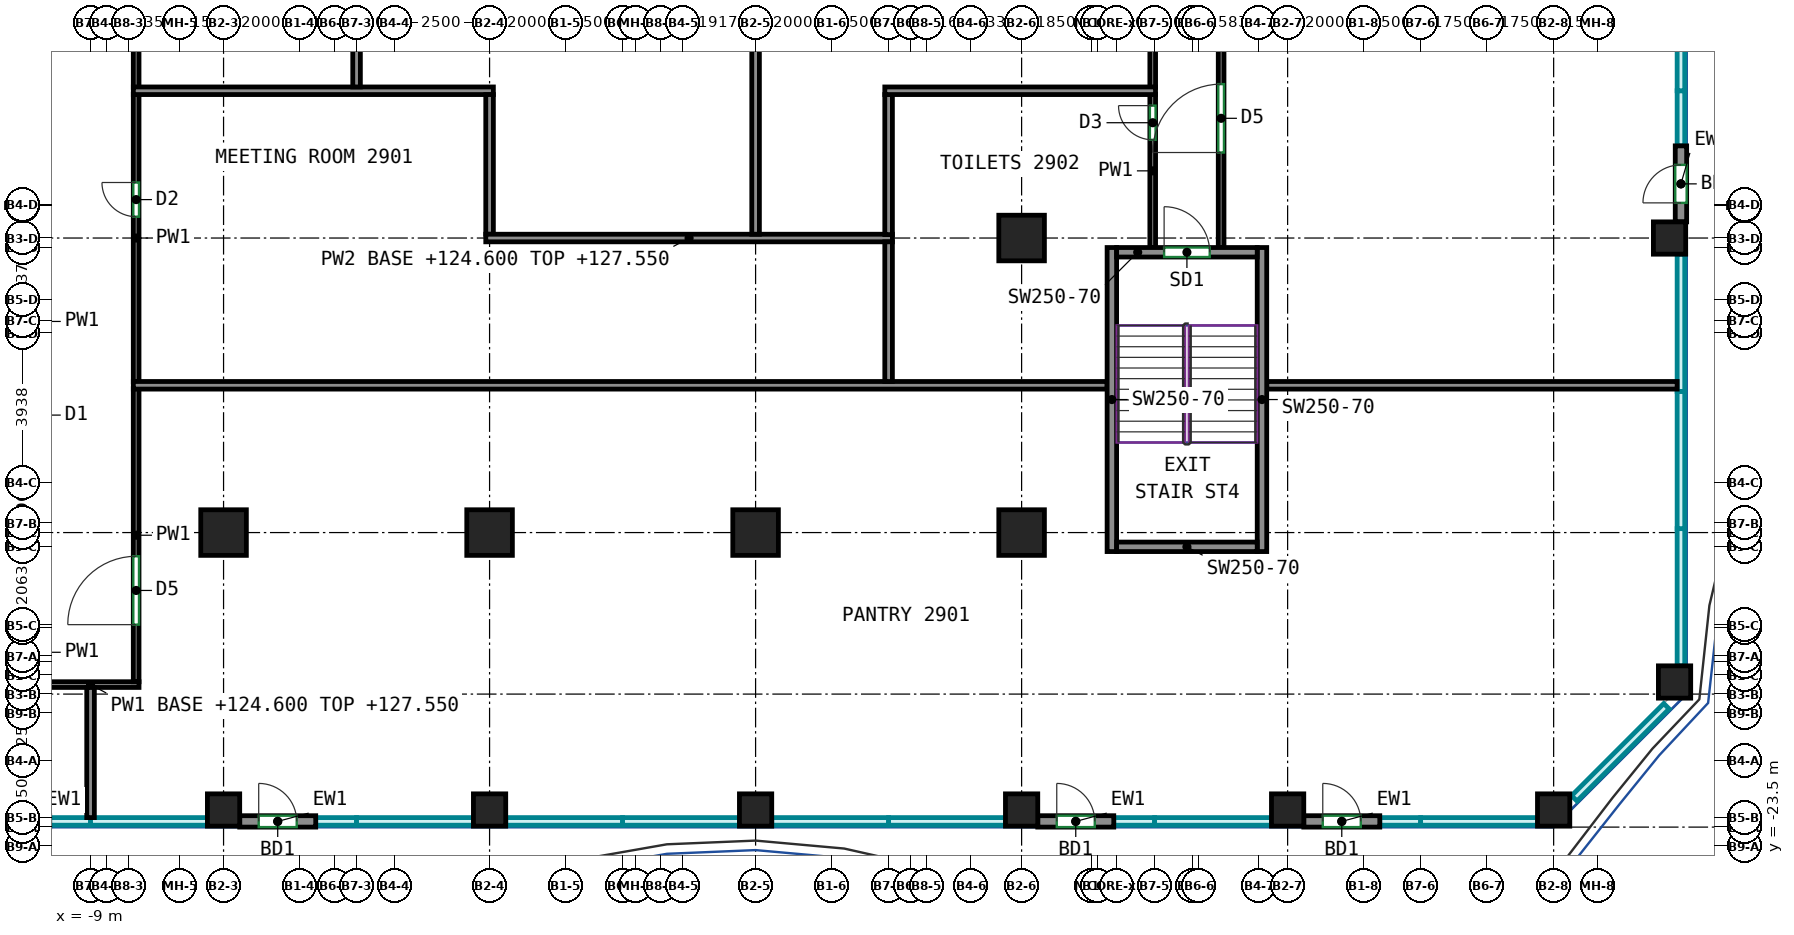
"""IFC4 building model, lengths in metres.
Left out: names, types, materials, properties, quantities, classifications, styles, units other than length and angle.
Written with IfcOpenShell. Run it as: python <this file> out.ifc"""

import sys

from ifc_helpers import new_model, si_unit, direction, frame, frame_2d, origin, origin_2d, place, context, subcontext, project, spatial, rectangle, extrude, source, transform, mapped, element, fill, save


model = new_model("IFC4")
c1 = context("Model", 3, precision=1e-05, world=origin(), true_north=direction((0.0, 1.0)))
c2 = subcontext(c1, "Body", "Model", "MODEL_VIEW")
j1 = project(units=[si_unit("LENGTHUNIT", "METRE"), si_unit("PLANEANGLEUNIT", "RADIAN")], contexts=[c1])
p1 = place(None, origin())
s1 = spatial("IfcSite", under=j1, at=p1, CompositionType="ELEMENT")
p2 = place(p1, origin())
s2 = spatial("IfcBuilding", under=s1, at=p2, CompositionType="ELEMENT")
p3 = place(p2, frame((0.0, 0.0, 124.6)))
s3 = spatial("IfcBuildingStorey", under=s2, at=p3, CompositionType="ELEMENT", Elevation=124.6)
m1 = source(origin(), c2, "Body", "SweptSolid", [
    extrude(rectangle(XDim=0.85, YDim=0.85, at=origin_2d()), origin(), (0.0, 0.0, 1.0), 3.6),
])
p4 = place(p3, frame((-5.5, -22.55, 0.0), z_axis=(0.0, 0.0, 1.0), x_axis=(1.0, 0.0, 0.0)))
e1 = element("IfcColumn", 1, at=p4, inside=s3, PredefinedType="COLUMN", context=c2, shape_type="MappedRepresentation", body=[
    mapped(m1, transform((0.0, 0.0, 0.0))),
])
m2 = source(origin(), c2, "Body", "SweptSolid", [
    extrude(rectangle(XDim=1.2, YDim=1.2, at=origin_2d()), origin(), (0.0, 0.0, 1.0), 3.6),
])
p5 = place(p3, frame((-5.5, -15.25, 0.0), z_axis=(0.0, 0.0, 1.0), x_axis=(1.0, 0.0, 0.0)))
e2 = element("IfcColumn", 2, at=p5, inside=s3, PredefinedType="COLUMN", context=c2, shape_type="MappedRepresentation", body=[
    mapped(m2, transform((0.0, 0.0, 0.0))),
])
p6 = place(p3, frame((1.5, -22.55, 0.0), z_axis=(0.0, 0.0, 1.0), x_axis=(1.0, 0.0, 0.0)))
e3 = element("IfcColumn", 3, at=p6, inside=s3, PredefinedType="COLUMN", context=c2, shape_type="MappedRepresentation", body=[
    mapped(m1, transform((0.0, 0.0, 0.0))),
])
p7 = place(p3, frame((1.5, -15.25, 0.0), z_axis=(0.0, 0.0, 1.0), x_axis=(1.0, 0.0, 0.0)))
e4 = element("IfcColumn", 4, at=p7, inside=s3, PredefinedType="COLUMN", context=c2, shape_type="MappedRepresentation", body=[
    mapped(m2, transform((0.0, 0.0, 0.0))),
])
p8 = place(p3, frame((8.5, -22.55, 0.0), z_axis=(0.0, 0.0, 1.0), x_axis=(1.0, 0.0, 0.0)))
e5 = element("IfcColumn", 5, at=p8, inside=s3, PredefinedType="COLUMN", context=c2, shape_type="MappedRepresentation", body=[
    mapped(m1, transform((0.0, 0.0, 0.0))),
])
p9 = place(p3, frame((8.5, -15.25, 0.0), z_axis=(0.0, 0.0, 1.0), x_axis=(1.0, 0.0, 0.0)))
e6 = element("IfcColumn", 6, at=p9, inside=s3, PredefinedType="COLUMN", context=c2, shape_type="MappedRepresentation", body=[
    mapped(m2, transform((0.0, 0.0, 0.0))),
])
p10 = place(p3, frame((15.5, -22.55, 0.0), z_axis=(0.0, 0.0, 1.0), x_axis=(1.0, 0.0, 0.0)))
e7 = element("IfcColumn", 7, at=p10, inside=s3, PredefinedType="COLUMN", context=c2, shape_type="MappedRepresentation", body=[
    mapped(m1, transform((0.0, 0.0, 0.0))),
])
for number, where, z_axis, x_axis in (
    (8, (15.5, -15.25, 0.0), (0.0, 0.0, 1.0), (1.0, 0.0, 0.0)),
    (9, (15.5, -7.5, 0.0), (0.0, 0.0, 1.0), (1.0, 0.0, 0.0)),
):
    element("IfcColumn", number, at=place(p3, frame(where, z_axis=z_axis, x_axis=x_axis)), inside=s3, PredefinedType="COLUMN", context=c2, shape_type="MappedRepresentation", body=[
        mapped(m2, transform((0.0, 0.0, 0.0))),
    ])
for number, where, z_axis, x_axis in (
    (10, (22.5, -22.55, 0.0), (0.0, 0.0, 1.0), (1.0, 0.0, 0.0)),
    (11, (29.5, -22.55, 0.0), (0.0, 0.0, 1.0), (1.0, 0.0, 0.0)),
    (12, (32.55, -7.5, 0.0), (0.0, 0.0, 1.0), (1.0, 0.0, 0.0)),
    (13, (32.682, -19.182, 0.0), (0.0, 0.0, 1.0), (1.0, 0.0, 0.0)),
):
    element("IfcColumn", number, at=place(p3, frame(where, z_axis=z_axis, x_axis=x_axis)), inside=s3, PredefinedType="COLUMN", context=c2, shape_type="MappedRepresentation", body=[
        mapped(m1, transform((0.0, 0.0, 0.0))),
    ])
m3 = source(origin(), c2, "Body", "SweptSolid", [
    extrude(rectangle(XDim=8.0, YDim=0.25, at=frame_2d((4.0, 0.0))), origin(), (0.0, 0.0, 1.0), 3.6),
])
for number, where, z_axis, x_axis in (
    (14, (17.875, -15.75, 0.0), (0.0, 0.0, 1.0), (0.0, 1.0, 0.0)),
    (15, (21.825, -15.75, 0.0), (0.0, 0.0, 1.0), (0.0, 1.0, 0.0)),
):
    element("IfcWall", number, at=place(p3, frame(where, z_axis=z_axis, x_axis=x_axis)), inside=s3, PredefinedType="SHEAR", context=c2, shape_type="MappedRepresentation", body=[
        mapped(m3, transform((0.0, 0.0, 0.0))),
    ])
m4 = source(origin(), c2, "Body", "SweptSolid", [
    extrude(rectangle(XDim=3.7, YDim=0.25, at=frame_2d((1.85, 0.0))), origin(), (0.0, 0.0, 1.0), 3.6),
])
p11 = place(p3, frame((18.0, -15.625, 0.0), z_axis=(0.0, 0.0, 1.0), x_axis=(1.0, 0.0, 0.0)))
e16 = element("IfcWall", 16, at=p11, inside=s3, PredefinedType="SHEAR", context=c2, shape_type="MappedRepresentation", body=[
    mapped(m4, transform((0.0, 0.0, 0.0))),
])
p12 = place(p3, frame((18.0, -7.875, 0.0), z_axis=(0.0, 0.0, 1.0), x_axis=(1.0, 0.0, 0.0)))
e17 = element("IfcWall", 17, at=p12, inside=s3, PredefinedType="SHEAR", context=c2, shape_type="MappedRepresentation", body=[
    mapped(m4, transform((0.0, 0.0, 0.0))),
])
p13 = place(p12, frame((1.25, 0.0, 0.0)))
e18 = element("IfcOpeningElement", 18, at=p13, cuts=e17, PredefinedType="OPENING", context=c2, shape_type="SweptSolid", body=[
    extrude(rectangle(XDim=1.2, YDim=2.1, at=frame_2d((0.6, 1.05))), frame((0.0, 0.135, 0.0), z_axis=(0.0, -1.0, 0.0), x_axis=(1.0, 0.0, 0.0)), (0.0, 0.0, 1.0), 0.27),
])
m5 = source(origin(), c2, "Body", "SweptSolid", [
    extrude(rectangle(XDim=2.0, YDim=0.3, at=frame_2d((1.0, 0.0))), origin(), (0.0, 0.0, 1.0), 3.6),
])
p14 = place(p3, frame((-5.075, -22.85, 0.0), z_axis=(0.0, 0.0, 1.0), x_axis=(1.0, 0.0, 0.0)))
e19 = element("IfcWall", 19, at=p14, inside=s3, PredefinedType="SOLIDWALL", context=c2, shape_type="MappedRepresentation", body=[
    mapped(m5, transform((0.0, 0.0, 0.0))),
])
p15 = place(p14, frame((0.5, 0.0, 0.0)))
e20 = element("IfcOpeningElement", 20, at=p15, cuts=e19, PredefinedType="OPENING", context=c2, shape_type="SweptSolid", body=[
    extrude(rectangle(XDim=1.0, YDim=2.1, at=frame_2d((0.5, 1.05))), frame((0.0, 0.16, 0.0), z_axis=(0.0, -1.0, 0.0), x_axis=(1.0, 0.0, 0.0)), (0.0, 0.0, 1.0), 0.32),
])
p16 = place(p3, frame((15.925, -22.85, 0.0), z_axis=(0.0, 0.0, 1.0), x_axis=(1.0, 0.0, 0.0)))
e21 = element("IfcWall", 21, at=p16, inside=s3, PredefinedType="SOLIDWALL", context=c2, shape_type="MappedRepresentation", body=[
    mapped(m5, transform((0.0, 0.0, 0.0))),
])
p17 = place(p16, frame((0.5, 0.0, 0.0)))
e22 = element("IfcOpeningElement", 22, at=p17, cuts=e21, PredefinedType="OPENING", context=c2, shape_type="SweptSolid", body=[
    extrude(rectangle(XDim=1.0, YDim=2.1, at=frame_2d((0.5, 1.05))), frame((0.0, 0.16, 0.0), z_axis=(0.0, -1.0, 0.0), x_axis=(1.0, 0.0, 0.0)), (0.0, 0.0, 1.0), 0.32),
])
p18 = place(p3, frame((22.925, -22.85, 0.0), z_axis=(0.0, 0.0, 1.0), x_axis=(1.0, 0.0, 0.0)))
e23 = element("IfcWall", 23, at=p18, inside=s3, PredefinedType="SOLIDWALL", context=c2, shape_type="MappedRepresentation", body=[
    mapped(m5, transform((0.0, 0.0, 0.0))),
])
p19 = place(p18, frame((0.5, 0.0, 0.0)))
e24 = element("IfcOpeningElement", 24, at=p19, cuts=e23, PredefinedType="OPENING", context=c2, shape_type="SweptSolid", body=[
    extrude(rectangle(XDim=1.0, YDim=2.1, at=frame_2d((0.5, 1.05))), frame((0.0, 0.16, 0.0), z_axis=(0.0, -1.0, 0.0), x_axis=(1.0, 0.0, 0.0)), (0.0, 0.0, 1.0), 0.32),
])
p20 = place(p3, frame((32.85, -7.075, 0.0), z_axis=(0.0, 0.0, 1.0), x_axis=(0.0, 1.0, 0.0)))
e25 = element("IfcWall", 25, at=p20, inside=s3, PredefinedType="SOLIDWALL", context=c2, shape_type="MappedRepresentation", body=[
    mapped(m5, transform((0.0, 0.0, 0.0))),
])
p21 = place(p20, frame((0.5, 0.0, 0.0)))
e26 = element("IfcOpeningElement", 26, at=p21, cuts=e25, PredefinedType="OPENING", context=c2, shape_type="SweptSolid", body=[
    extrude(rectangle(XDim=1.0, YDim=2.1, at=frame_2d((0.5, 1.05))), frame((0.0, 0.16, 0.0), z_axis=(0.0, -1.0, 0.0), x_axis=(1.0, 0.0, 0.0)), (0.0, 0.0, 1.0), 0.32),
])
p22 = place(p3, frame((-10.275, -19.25, 0.0), z_axis=(0.0, 0.0, 1.0), x_axis=(1.0, 0.0, 0.0)))
e27 = element("IfcWall", 27, at=p22, inside=s3, PredefinedType="PARTITIONING", context=c2, shape_type="SweptSolid", body=[
    extrude(rectangle(XDim=2.55, YDim=0.15, at=frame_2d((1.275, 0.0))), origin(), (0.0, 0.0, 1.0), 2.95),
])
p23 = place(p3, frame((-7.8, -3.535, 0.0), z_axis=(0.0, 0.0, 1.0), x_axis=(0.0, 1.0, 0.0)))
e28 = element("IfcWall", 28, at=p23, inside=s3, PredefinedType="PARTITIONING", context=c2, shape_type="SweptSolid", body=[
    extrude(rectangle(XDim=6.41, YDim=0.15, at=frame_2d((3.205, 0.0))), origin(), (0.0, 0.0, 1.0), 3.6),
])
p24 = place(p23, frame((2.304, 0.0, 0.0)))
e29 = element("IfcOpeningElement", 29, at=p24, cuts=e28, PredefinedType="OPENING", context=c2, shape_type="SweptSolid", body=[
    extrude(rectangle(XDim=0.9, YDim=2.1, at=frame_2d((0.45, 1.05))), frame((0.0, 0.085, 0.0), z_axis=(0.0, -1.0, 0.0), x_axis=(1.0, 0.0, 0.0)), (0.0, 0.0, 1.0), 0.17),
])
p25 = place(p3, frame((-7.8, -11.285, 0.0), z_axis=(0.0, 0.0, 1.0), x_axis=(0.0, 1.0, 0.0)))
e30 = element("IfcWall", 30, at=p25, inside=s3, PredefinedType="PARTITIONING", context=c2, shape_type="SweptSolid", body=[
    extrude(rectangle(XDim=7.57, YDim=0.15, at=frame_2d((3.785, 0.0))), origin(), (0.0, 0.0, 1.0), 3.6),
])
p26 = place(p25, frame((4.346, 0.0, 0.0)))
e31 = element("IfcOpeningElement", 31, at=p26, cuts=e30, PredefinedType="OPENING", context=c2, shape_type="SweptSolid", body=[
    extrude(rectangle(XDim=0.9, YDim=2.1, at=frame_2d((0.45, 1.05))), frame((0.0, 0.085, 0.0), z_axis=(0.0, -1.0, 0.0), x_axis=(1.0, 0.0, 0.0)), (0.0, 0.0, 1.0), 0.17),
])
p27 = place(p3, frame((-7.8, -19.175, 0.0), z_axis=(0.0, 0.0, 1.0), x_axis=(0.0, 1.0, 0.0)))
e32 = element("IfcWall", 32, at=p27, inside=s3, PredefinedType="PARTITIONING", context=c2, shape_type="SweptSolid", body=[
    extrude(rectangle(XDim=7.71, YDim=0.15, at=frame_2d((3.855, 0.0))), origin(), (0.0, 0.0, 1.0), 3.6),
])
p28 = place(p27, frame((1.502, 0.0, 0.0)))
e33 = element("IfcOpeningElement", 33, at=p28, cuts=e32, PredefinedType="OPENING", context=c2, shape_type="SweptSolid", body=[
    extrude(rectangle(XDim=1.8, YDim=2.1, at=frame_2d((0.9, 1.05))), frame((0.0, 0.085, 0.0), z_axis=(0.0, -1.0, 0.0), x_axis=(1.0, 0.0, 0.0)), (0.0, 0.0, 1.0), 0.17),
])
p29 = place(p3, frame((18.95, -7.75, 0.0), z_axis=(0.0, 0.0, 1.0), x_axis=(0.0, 1.0, 0.0)))
e34 = element("IfcWall", 34, at=p29, inside=s3, PredefinedType="PARTITIONING", context=c2, shape_type="SweptSolid", body=[
    extrude(rectangle(XDim=4.035, YDim=0.15, at=frame_2d((2.018, 0.0))), origin(), (0.0, 0.0, 1.0), 3.6),
])
p30 = place(p29, frame((2.834, 0.0, 0.0)))
e35 = element("IfcOpeningElement", 35, at=p30, cuts=e34, PredefinedType="OPENING", context=c2, shape_type="SweptSolid", body=[
    extrude(rectangle(XDim=0.9, YDim=2.1, at=frame_2d((0.45, 1.05))), frame((0.0, 0.085, 0.0), z_axis=(0.0, -1.0, 0.0), x_axis=(1.0, 0.0, 0.0)), (0.0, 0.0, 1.0), 0.17),
])
p31 = place(p3, frame((20.75, -7.75, 0.0), z_axis=(0.0, 0.0, 1.0), x_axis=(0.0, 1.0, 0.0)))
e36 = element("IfcWall", 36, at=p31, inside=s3, PredefinedType="PARTITIONING", context=c2, shape_type="SweptSolid", body=[
    extrude(rectangle(XDim=11.8, YDim=0.15, at=frame_2d((5.9, 0.0))), origin(), (0.0, 0.0, 1.0), 3.6),
])
p32 = place(p31, frame((2.5, 0.0, 0.0)))
e37 = element("IfcOpeningElement", 37, at=p32, cuts=e36, PredefinedType="OPENING", context=c2, shape_type="SweptSolid", body=[
    extrude(rectangle(XDim=1.8, YDim=2.1, at=frame_2d((0.9, 1.05))), frame((0.0, 0.085, 0.0), z_axis=(0.0, -1.0, 0.0), x_axis=(1.0, 0.0, 0.0)), (0.0, 0.0, 1.0), 0.17),
])
p33 = place(p3, frame((18.95, -3.535, 0.0), z_axis=(0.0, 0.0, 1.0), x_axis=(0.0, 1.0, 0.0)))
e38 = element("IfcWall", 38, at=p33, inside=s3, PredefinedType="PARTITIONING", context=c2, shape_type="SweptSolid", body=[
    extrude(rectangle(XDim=7.585, YDim=0.15, at=frame_2d((3.792, 0.0))), origin(), (0.0, 0.0, 1.0), 3.6),
])
p34 = place(p33, frame((2.734, 0.0, 0.0)))
e39 = element("IfcOpeningElement", 39, at=p34, cuts=e38, PredefinedType="OPENING", context=c2, shape_type="SweptSolid", body=[
    extrude(rectangle(XDim=0.9, YDim=2.1, at=frame_2d((0.45, 1.05))), frame((0.0, 0.085, 0.0), z_axis=(0.0, -1.0, 0.0), x_axis=(1.0, 0.0, 0.0)), (0.0, 0.0, 1.0), 0.17),
])
p35 = place(p3, frame((-9.0, -22.75, 0.0), z_axis=(0.0, 0.0, 1.0), x_axis=(0.0, 1.0, 0.0)))
e40 = element("IfcWall", 40, at=p35, inside=s3, PredefinedType="PARTITIONING", context=c2, shape_type="SweptSolid", body=[
    extrude(rectangle(XDim=3.424, YDim=0.2, at=frame_2d((1.712, 0.0))), origin(), (0.0, 0.0, 1.0), 3.6),
])
p36 = place(p3, frame((-7.874, -3.625, 0.0), z_axis=(0.0, 0.0, 1.0), x_axis=(1.0, 0.0, 0.0)))
e41 = element("IfcWall", 41, at=p36, inside=s3, PredefinedType="PARTITIONING", context=c2, shape_type="SweptSolid", body=[
    extrude(rectangle(XDim=9.474, YDim=0.2, at=frame_2d((4.737, 0.0))), origin(), (0.0, 0.0, 1.0), 3.6),
])
p37 = place(p3, frame((-2.0, -3.525, 0.0), z_axis=(0.0, 0.0, 1.0), x_axis=(0.0, 1.0, 0.0)))
e42 = element("IfcWall", 42, at=p37, inside=s3, PredefinedType="PARTITIONING", context=c2, shape_type="SweptSolid", body=[
    extrude(rectangle(XDim=6.399, YDim=0.2, at=frame_2d((3.199, 0.0))), origin(), (0.0, 0.0, 1.0), 3.6),
])
p38 = place(p3, frame((-7.874, -11.375, 0.0), z_axis=(0.0, 0.0, 1.0), x_axis=(1.0, 0.0, 0.0)))
e43 = element("IfcWall", 43, at=p38, inside=s3, PredefinedType="PARTITIONING", context=c2, shape_type="SweptSolid", body=[
    extrude(rectangle(XDim=25.624, YDim=0.2, at=frame_2d((12.812, 0.0))), origin(), (0.0, 0.0, 1.0), 3.6),
])
p39 = place(p3, frame((1.5, -7.4, 0.0), z_axis=(0.0, 0.0, 1.0), x_axis=(0.0, 1.0, 0.0)))
e44 = element("IfcWall", 44, at=p39, inside=s3, PredefinedType="PARTITIONING", context=c2, shape_type="SweptSolid", body=[
    extrude(rectangle(XDim=3.675, YDim=0.2, at=frame_2d((1.837, 0.0))), origin(), (0.0, 0.0, 1.0), 3.6),
])
p40 = place(p3, frame((1.4, -7.5, 0.0), z_axis=(0.0, 0.0, 1.0), x_axis=(1.0, 0.0, 0.0)))
e45 = element("IfcWall", 45, at=p40, inside=s3, PredefinedType="PARTITIONING", context=c2, shape_type="SweptSolid", body=[
    extrude(rectangle(XDim=10.7, YDim=0.2, at=frame_2d((5.35, 0.0))), origin(), (0.0, 0.0, 1.0), 2.95),
])
p41 = place(p3, frame((12.0, -11.275, 0.0), z_axis=(0.0, 0.0, 1.0), x_axis=(0.0, 1.0, 0.0)))
e46 = element("IfcWall", 46, at=p41, inside=s3, PredefinedType="PARTITIONING", context=c2, shape_type="SweptSolid", body=[
    extrude(rectangle(XDim=3.675, YDim=0.2, at=frame_2d((1.837, 0.0))), origin(), (0.0, 0.0, 1.0), 3.6),
])
p42 = place(p3, frame((21.95, -11.375, 0.0), z_axis=(0.0, 0.0, 1.0), x_axis=(1.0, 0.0, 0.0)))
e47 = element("IfcWall", 47, at=p42, inside=s3, PredefinedType="PARTITIONING", context=c2, shape_type="SweptSolid", body=[
    extrude(rectangle(XDim=10.8, YDim=0.2, at=frame_2d((5.4, 0.0))), origin(), (0.0, 0.0, 1.0), 3.6),
])
p43 = place(p3, frame((8.5, -7.4, 0.0), z_axis=(0.0, 0.0, 1.0), x_axis=(0.0, 1.0, 0.0)))
e48 = element("IfcWall", 48, at=p43, inside=s3, PredefinedType="PARTITIONING", context=c2, shape_type="SweptSolid", body=[
    extrude(rectangle(XDim=7.55, YDim=0.2, at=frame_2d((3.775, 0.0))), origin(), (0.0, 0.0, 1.0), 3.6),
])
p44 = place(p3, frame((12.0, -7.41, 0.0), z_axis=(0.0, 0.0, 1.0), x_axis=(0.0, 1.0, 0.0)))
e49 = element("IfcWall", 49, at=p44, inside=s3, PredefinedType="PARTITIONING", context=c2, shape_type="SweptSolid", body=[
    extrude(rectangle(XDim=3.685, YDim=0.2, at=frame_2d((1.842, 0.0))), origin(), (0.0, 0.0, 1.0), 3.6),
])
p45 = place(p3, frame((11.9, -3.625, 0.0), z_axis=(0.0, 0.0, 1.0), x_axis=(1.0, 0.0, 0.0)))
e50 = element("IfcWall", 50, at=p45, inside=s3, PredefinedType="PARTITIONING", context=c2, shape_type="SweptSolid", body=[
    extrude(rectangle(XDim=7.124, YDim=0.2, at=frame_2d((3.562, 0.0))), origin(), (0.0, 0.0, 1.0), 3.6),
])
p46 = place(p15, origin())
e51 = element("IfcDoor", 51, at=p46, inside=s3, OperationType="SINGLE_SWING_LEFT", PredefinedType="DOOR", context=c2, shape_type="SweptSolid", body=[
    extrude(rectangle(XDim=1.0, YDim=2.1, at=frame_2d((0.5, 1.05))), frame((0.0, 0.025, 0.0), z_axis=(0.0, -1.0, 0.0), x_axis=(1.0, 0.0, 0.0)), (0.0, 0.0, 1.0), 0.05),
])
fill(e20, e51)
p47 = place(p17, origin())
e52 = element("IfcDoor", 52, at=p47, inside=s3, OperationType="SINGLE_SWING_LEFT", PredefinedType="DOOR", context=c2, shape_type="SweptSolid", body=[
    extrude(rectangle(XDim=1.0, YDim=2.1, at=frame_2d((0.5, 1.05))), frame((0.0, 0.025, 0.0), z_axis=(0.0, -1.0, 0.0), x_axis=(1.0, 0.0, 0.0)), (0.0, 0.0, 1.0), 0.05),
])
fill(e22, e52)
p48 = place(p19, origin())
e53 = element("IfcDoor", 53, at=p48, inside=s3, OperationType="SINGLE_SWING_LEFT", PredefinedType="DOOR", context=c2, shape_type="SweptSolid", body=[
    extrude(rectangle(XDim=1.0, YDim=2.1, at=frame_2d((0.5, 1.05))), frame((0.0, 0.025, 0.0), z_axis=(0.0, -1.0, 0.0), x_axis=(1.0, 0.0, 0.0)), (0.0, 0.0, 1.0), 0.05),
])
fill(e24, e53)
p49 = place(p21, origin())
e54 = element("IfcDoor", 54, at=p49, inside=s3, OperationType="SINGLE_SWING_LEFT", PredefinedType="DOOR", context=c2, shape_type="SweptSolid", body=[
    extrude(rectangle(XDim=1.0, YDim=2.1, at=frame_2d((0.5, 1.05))), frame((0.0, 0.025, 0.0), z_axis=(0.0, -1.0, 0.0), x_axis=(1.0, 0.0, 0.0)), (0.0, 0.0, 1.0), 0.05),
])
fill(e26, e54)
p50 = place(p13, origin())
e55 = element("IfcDoor", 55, at=p50, inside=s3, OperationType="DOUBLE_DOOR_SINGLE_SWING", PredefinedType="DOOR", context=c2, shape_type="SweptSolid", body=[
    extrude(rectangle(XDim=1.2, YDim=2.1, at=frame_2d((0.6, 1.05))), frame((0.0, 0.025, 0.0), z_axis=(0.0, -1.0, 0.0), x_axis=(1.0, 0.0, 0.0)), (0.0, 0.0, 1.0), 0.05),
])
fill(e18, e55)
p51 = place(p28, origin())
e56 = element("IfcDoor", 56, at=p51, inside=s3, OperationType="DOUBLE_DOOR_SINGLE_SWING", PredefinedType="DOOR", context=c2, shape_type="SweptSolid", body=[
    extrude(rectangle(XDim=1.8, YDim=2.1, at=frame_2d((0.9, 1.05))), frame((0.0, 0.025, 0.0), z_axis=(0.0, -1.0, 0.0), x_axis=(1.0, 0.0, 0.0)), (0.0, 0.0, 1.0), 0.05),
])
fill(e33, e56)
p52 = place(p26, origin())
e57 = element("IfcDoor", 57, at=p52, inside=s3, OperationType="SINGLE_SWING_RIGHT", PredefinedType="DOOR", context=c2, shape_type="SweptSolid", body=[
    extrude(rectangle(XDim=0.9, YDim=2.1, at=frame_2d((0.45, 1.05))), frame((0.0, 0.025, 0.0), z_axis=(0.0, -1.0, 0.0), x_axis=(1.0, 0.0, 0.0)), (0.0, 0.0, 1.0), 0.05),
])
fill(e31, e57)
p53 = place(p30, origin())
e58 = element("IfcDoor", 58, at=p53, inside=s3, OperationType="SINGLE_SWING_RIGHT", PredefinedType="DOOR", context=c2, shape_type="SweptSolid", body=[
    extrude(rectangle(XDim=0.9, YDim=2.1, at=frame_2d((0.45, 1.05))), frame((0.0, 0.025, 0.0), z_axis=(0.0, -1.0, 0.0), x_axis=(1.0, 0.0, 0.0)), (0.0, 0.0, 1.0), 0.05),
])
fill(e35, e58)
p54 = place(p32, origin())
e59 = element("IfcDoor", 59, at=p54, inside=s3, OperationType="DOUBLE_DOOR_SINGLE_SWING", PredefinedType="DOOR", context=c2, shape_type="SweptSolid", body=[
    extrude(rectangle(XDim=1.8, YDim=2.1, at=frame_2d((0.9, 1.05))), frame((0.0, 0.025, 0.0), z_axis=(0.0, -1.0, 0.0), x_axis=(1.0, 0.0, 0.0)), (0.0, 0.0, 1.0), 0.05),
])
fill(e37, e59)
save(model, sys.argv[1])
